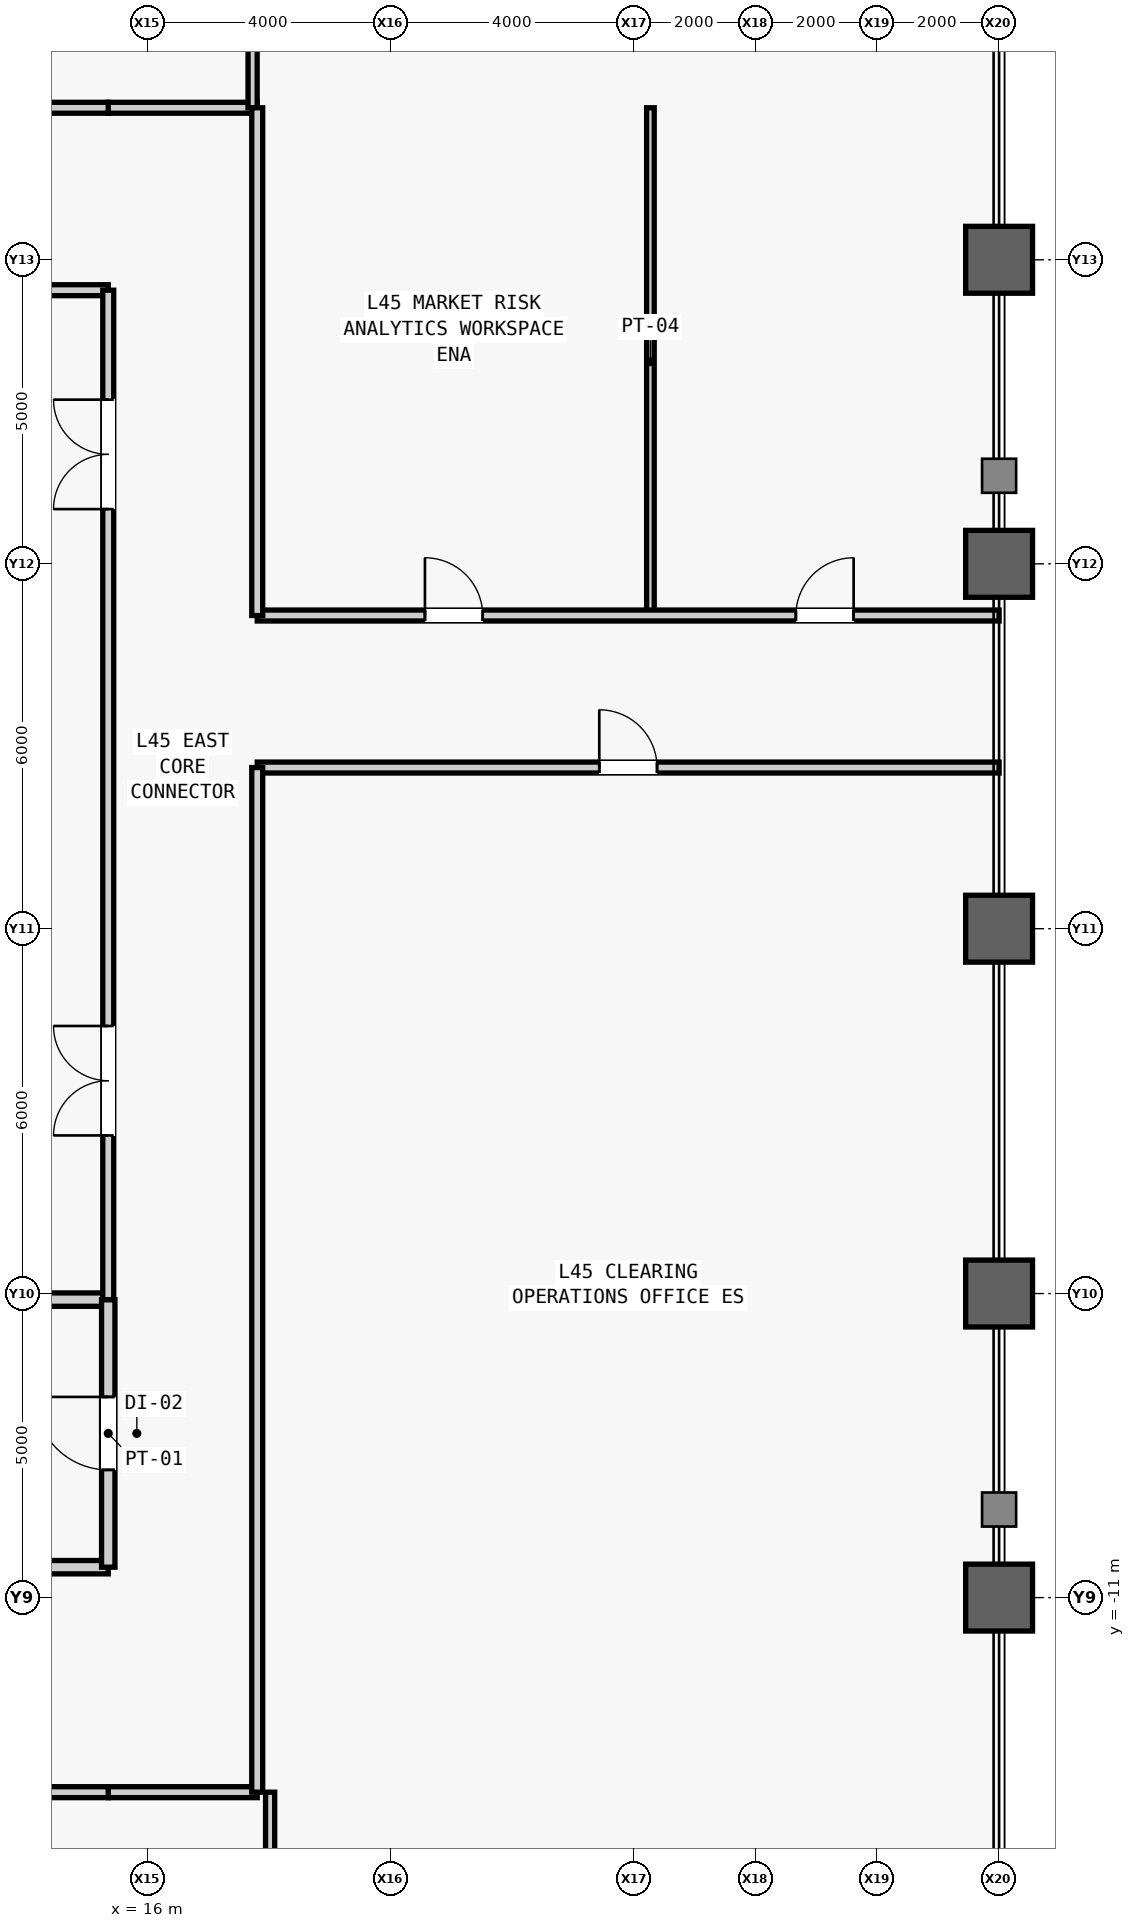
"""IFC4 building model, lengths in metres.
Left out: names, types, materials, properties, quantities, classifications, styles, units other than length and angle.
Written with IfcOpenShell. Run it as: python <this file> out.ifc"""

import sys

from ifc_helpers import new_model, si_unit, direction, frame, frame_2d, origin, origin_2d, place, context, subcontext, project, spatial, rectangle, hollow_rectangle, extrude, source, transform, mapped, element, fill, save


model = new_model("IFC4")
c1 = context("Model", 3, precision=1e-05, world=origin(), true_north=direction((0.0, 1.0)))
c2 = subcontext(c1, "Body", "Model", "MODEL_VIEW")
j1 = project(units=[si_unit("LENGTHUNIT", "METRE"), si_unit("PLANEANGLEUNIT", "RADIAN")], contexts=[c1])
p1 = place(None, origin())
s1 = spatial("IfcSite", under=j1, at=p1, CompositionType="ELEMENT")
p2 = place(p1, origin())
s2 = spatial("IfcBuilding", under=s1, at=p2, CompositionType="ELEMENT")
p3 = place(p2, frame((0.0, 0.0, 195.1)))
s3 = spatial("IfcBuildingStorey", under=s2, at=p3, CompositionType="ELEMENT", Elevation=195.1)
m1 = source(origin(), c2, "Body", "SweptSolid", [
    extrude(hollow_rectangle(XDim=1.1, YDim=1.1, WallThickness=0.06, at=origin_2d()), origin(), (0.0, 0.0, 1.0), 4.0),
])
for number, where, z_axis, x_axis in (
    (1, (30.0, -11.0, 0.0), (0.0, 0.0, 1.0), (1.0, 0.0, 0.0)),
    (2, (30.0, -6.0, 0.0), (0.0, 0.0, 1.0), (1.0, 0.0, 0.0)),
    (3, (30.0, 0.0, 0.0), (0.0, 0.0, 1.0), (1.0, 0.0, 0.0)),
    (4, (30.0, 6.0, 0.0), (0.0, 0.0, 1.0), (1.0, 0.0, 0.0)),
    (5, (30.0, 11.0, 0.0), (0.0, 0.0, 1.0), (1.0, 0.0, 0.0)),
):
    element("IfcColumn", number, at=place(p3, frame(where, z_axis=z_axis, x_axis=x_axis)), inside=s3, PredefinedType="COLUMN", context=c2, shape_type="MappedRepresentation", body=[
        mapped(m1, transform((0.0, 0.0, 0.0), scale=1.0)),
    ])
m2 = source(origin(), c2, "Body", "SweptSolid", [
    extrude(rectangle(XDim=4.05, YDim=0.22, at=frame_2d((2.025, 0.0))), origin(), (0.0, 0.0, 1.0), 3.78),
])
p4 = place(p3, frame((11.3, -10.5, 0.0), z_axis=(0.0, 0.0, 1.0), x_axis=(1.0, 0.0, 0.0)))
e6 = element("IfcWall", 6, at=p4, inside=s3, PredefinedType="PARTITIONING", context=c2, shape_type="MappedRepresentation", body=[
    mapped(m2, transform((0.0, 0.0, 0.0), scale=1.0)),
])
m3 = source(origin(), c2, "Body", "SweptSolid", [
    extrude(rectangle(XDim=4.05, YDim=0.22, at=frame_2d((2.025, 0.0))), origin(), (0.0, 0.0, 1.0), 3.007),
])
p5 = place(p3, frame((11.3, -6.1, 0.0), z_axis=(0.0, 0.0, 1.0), x_axis=(1.0, 0.0, 0.0)))
e7 = element("IfcWall", 7, at=p5, inside=s3, PredefinedType="PARTITIONING", context=c2, shape_type="MappedRepresentation", body=[
    mapped(m3, transform((0.0, 0.0, 0.0), scale=1.0)),
])
m4 = source(origin(), c2, "Body", "SweptSolid", [
    extrude(rectangle(XDim=4.4, YDim=0.22, at=frame_2d((2.2, 0.0))), origin(), (0.0, 0.0, 1.0), 3.78),
])
p6 = place(p3, frame((15.35, -10.5, 0.0), z_axis=(0.0, 0.0, 1.0), x_axis=(0.0, 1.0, 0.0)))
e8 = element("IfcWall", 8, at=p6, inside=s3, PredefinedType="PARTITIONING", context=c2, shape_type="MappedRepresentation", body=[
    mapped(m4, transform((0.0, 0.0, 0.0), scale=1.0)),
])
m5 = source(origin(), c2, "Body", "SweptSolid", [
    extrude(rectangle(XDim=1.2, YDim=2.2, at=frame_2d((0.6, 1.1))), frame((0.0, 0.12, 0.0), z_axis=(0.0, -1.0, 0.0), x_axis=(1.0, 0.0, 0.0)), (0.0, 0.0, 1.0), 0.24),
])
p7 = place(p6, frame((1.6, 0.0, 0.0)))
e9 = element("IfcOpeningElement", 9, at=p7, cuts=e8, PredefinedType="OPENING", context=c2, shape_type="MappedRepresentation", body=[
    mapped(m5, transform((0.0, 0.0, 0.0), scale=1.0)),
])
m6 = source(origin(), c2, "Body", "SweptSolid", [
    extrude(rectangle(XDim=4.05, YDim=0.18, at=frame_2d((2.025, 0.0))), origin(), (0.0, 0.0, 1.0), 3.78),
])
p8 = place(p3, frame((11.3, 10.5, 0.0), z_axis=(0.0, 0.0, 1.0), x_axis=(1.0, 0.0, 0.0)))
e10 = element("IfcWall", 10, at=p8, inside=s3, PredefinedType="PARTITIONING", context=c2, shape_type="MappedRepresentation", body=[
    mapped(m6, transform((0.0, 0.0, 0.0), scale=1.0)),
])
m7 = source(origin(), c2, "Body", "SweptSolid", [
    extrude(rectangle(XDim=16.6, YDim=0.18, at=frame_2d((8.3, 0.0))), origin(), (0.0, 0.0, 1.0), 3.78),
])
p9 = place(p3, frame((15.35, -6.1, 0.0), z_axis=(0.0, 0.0, 1.0), x_axis=(0.0, 1.0, 0.0)))
e11 = element("IfcWall", 11, at=p9, inside=s3, PredefinedType="PARTITIONING", context=c2, shape_type="MappedRepresentation", body=[
    mapped(m7, transform((0.0, 0.0, 0.0), scale=1.0)),
])
m8 = source(origin(), c2, "Body", "SweptSolid", [
    extrude(rectangle(XDim=1.8, YDim=2.25, at=frame_2d((0.9, 1.125))), frame((0.0, 0.1, 0.0), z_axis=(0.0, -1.0, 0.0), x_axis=(1.0, 0.0, 0.0)), (0.0, 0.0, 1.0), 0.2),
])
p10 = place(p9, frame((2.7, 0.0, 0.0)))
e12 = element("IfcOpeningElement", 12, at=p10, cuts=e11, PredefinedType="OPENING", context=c2, shape_type="MappedRepresentation", body=[
    mapped(m8, transform((0.0, 0.0, 0.0), scale=1.0)),
])
p11 = place(p9, frame((13.0, 0.0, 0.0)))
e13 = element("IfcOpeningElement", 13, at=p11, cuts=e11, PredefinedType="OPENING", context=c2, shape_type="MappedRepresentation", body=[
    mapped(m8, transform((0.0, 0.0, 0.0), scale=1.0)),
])
m9 = source(origin(), c2, "Body", "SweptSolid", [
    extrude(rectangle(XDim=2.45, YDim=0.18, at=frame_2d((1.225, 0.0))), origin(), (0.0, 0.0, 1.0), 3.78),
])
for number, where, z_axis, x_axis in (
    (14, (15.35, -14.2, 0.0), (0.0, 0.0, 1.0), (1.0, 0.0, 0.0)),
    (15, (15.35, 13.5, 0.0), (0.0, 0.0, 1.0), (1.0, 0.0, 0.0)),
):
    element("IfcWall", number, at=place(p3, frame(where, z_axis=z_axis, x_axis=x_axis)), inside=s3, PredefinedType="PARTITIONING", context=c2, shape_type="MappedRepresentation", body=[
        mapped(m9, transform((0.0, 0.0, 0.0), scale=1.0)),
    ])
m10 = source(origin(), c2, "Body", "SweptSolid", [
    extrude(rectangle(XDim=15.8, YDim=0.15, at=frame_2d((7.9, 0.0))), origin(), (0.0, 0.0, 1.0), 3.78),
])
p12 = place(p3, frame((18.012, -30.0, 0.0), z_axis=(0.0, 0.0, 1.0), x_axis=(0.0, 1.0, 0.0)))
e16 = element("IfcWall", 16, at=p12, inside=s3, PredefinedType="PARTITIONING", context=c2, shape_type="MappedRepresentation", body=[
    mapped(m10, transform((0.0, 0.0, 0.0), scale=1.0)),
])
m11 = source(origin(), c2, "Body", "SweptSolid", [
    extrude(rectangle(XDim=0.95, YDim=2.15, at=frame_2d((0.475, 1.075))), frame((0.0, 0.085, 0.0), z_axis=(0.0, -1.0, 0.0), x_axis=(1.0, 0.0, 0.0)), (0.0, 0.0, 1.0), 0.17),
])
p13 = place(p12, frame((11.375, 0.0, 0.0)))
e17 = element("IfcOpeningElement", 17, at=p13, cuts=e16, PredefinedType="OPENING", context=c2, shape_type="MappedRepresentation", body=[
    mapped(m11, transform((0.0, 0.0, 0.0), scale=1.0)),
])
m12 = source(origin(), c2, "Body", "SweptSolid", [
    extrude(rectangle(XDim=13.25, YDim=0.18, at=frame_2d((6.625, 0.0))), origin(), (0.0, 0.0, 1.0), 3.78),
])
p14 = place(p3, frame((2.1, -14.2, 0.0), z_axis=(0.0, 0.0, 1.0), x_axis=(1.0, 0.0, 0.0)))
e18 = element("IfcWall", 18, at=p14, inside=s3, PredefinedType="PARTITIONING", context=c2, shape_type="MappedRepresentation", body=[
    mapped(m12, transform((0.0, 0.0, 0.0), scale=1.0)),
])
m13 = source(origin(), c2, "Body", "SweptSolid", [
    extrude(rectangle(XDim=16.5, YDim=0.15, at=frame_2d((8.25, 0.0))), origin(), (0.0, 0.0, 1.0), 3.78),
])
p15 = place(p3, frame((17.724, 13.5, 0.0), z_axis=(0.0, 0.0, 1.0), x_axis=(0.0, 1.0, 0.0)))
e19 = element("IfcWall", 19, at=p15, inside=s3, PredefinedType="PARTITIONING", context=c2, shape_type="MappedRepresentation", body=[
    mapped(m13, transform((0.0, 0.0, 0.0), scale=1.0)),
])
p16 = place(p15, frame((11.9, 0.0, 0.0)))
e20 = element("IfcOpeningElement", 20, at=p16, cuts=e19, PredefinedType="OPENING", context=c2, shape_type="MappedRepresentation", body=[
    mapped(m11, transform((0.0, 0.0, 0.0), scale=1.0)),
])
m14 = source(origin(), c2, "Body", "SweptSolid", [
    extrude(rectangle(XDim=4.25, YDim=0.18, at=frame_2d((2.125, 0.0))), origin(), (0.0, 0.0, 1.0), 3.78),
])
p17 = place(p3, frame((11.1, 13.5, 0.0), z_axis=(0.0, 0.0, 1.0), x_axis=(1.0, 0.0, 0.0)))
e21 = element("IfcWall", 21, at=p17, inside=s3, PredefinedType="PARTITIONING", context=c2, shape_type="MappedRepresentation", body=[
    mapped(m14, transform((0.0, 0.0, 0.0), scale=1.0)),
])
m15 = source(origin(), c2, "Body", "SweptSolid", [
    extrude(rectangle(XDim=12.2, YDim=0.18, at=frame_2d((6.1, 0.0))), origin(), (0.0, 0.0, 1.0), 3.78),
])
p18 = place(p3, frame((17.8, 2.65, 0.0), z_axis=(0.0, 0.0, 1.0), x_axis=(1.0, 0.0, 0.0)))
e22 = element("IfcWall", 22, at=p18, inside=s3, PredefinedType="PARTITIONING", context=c2, shape_type="MappedRepresentation", body=[
    mapped(m15, transform((0.0, 0.0, 0.0), scale=1.0)),
])
m16 = source(origin(), c2, "Body", "SweptSolid", [
    extrude(rectangle(XDim=0.95, YDim=2.15, at=frame_2d((0.475, 1.075))), frame((0.0, 0.1, 0.0), z_axis=(0.0, -1.0, 0.0), x_axis=(1.0, 0.0, 0.0)), (0.0, 0.0, 1.0), 0.2),
])
p19 = place(p18, frame((5.625, 0.0, 0.0)))
e23 = element("IfcOpeningElement", 23, at=p19, cuts=e22, PredefinedType="OPENING", context=c2, shape_type="MappedRepresentation", body=[
    mapped(m16, transform((0.0, 0.0, 0.0), scale=1.0)),
])
m17 = source(origin(), c2, "Body", "SweptSolid", [
    extrude(rectangle(XDim=16.85, YDim=0.18, at=frame_2d((8.425, 0.0))), origin(), (0.0, 0.0, 1.0), 3.78),
])
p20 = place(p3, frame((17.8, -14.2, 0.0), z_axis=(0.0, 0.0, 1.0), x_axis=(0.0, 1.0, 0.0)))
e24 = element("IfcWall", 24, at=p20, inside=s3, PredefinedType="PARTITIONING", context=c2, shape_type="MappedRepresentation", body=[
    mapped(m17, transform((0.0, 0.0, 0.0), scale=1.0)),
])
m18 = source(origin(), c2, "Body", "SweptSolid", [
    extrude(rectangle(XDim=8.35, YDim=0.125, at=frame_2d((4.175, 0.0))), origin(), (0.0, 0.0, 1.0), 3.78),
])
p21 = place(p3, frame((24.266, 5.15, 0.0), z_axis=(0.0, 0.0, 1.0), x_axis=(0.0, 1.0, 0.0)))
e25 = element("IfcWall", 25, at=p21, inside=s3, PredefinedType="PARTITIONING", context=c2, shape_type="MappedRepresentation", body=[
    mapped(m18, transform((0.0, 0.0, 0.0), scale=1.0)),
])
p22 = place(p3, frame((17.8, 5.15, 0.0), z_axis=(0.0, 0.0, 1.0), x_axis=(1.0, 0.0, 0.0)))
e26 = element("IfcWall", 26, at=p22, inside=s3, PredefinedType="PARTITIONING", context=c2, shape_type="MappedRepresentation", body=[
    mapped(m15, transform((0.0, 0.0, 0.0), scale=1.0)),
])
p23 = place(p22, frame((2.758, 0.0, 0.0)))
e27 = element("IfcOpeningElement", 27, at=p23, cuts=e26, PredefinedType="OPENING", context=c2, shape_type="MappedRepresentation", body=[
    mapped(m16, transform((0.0, 0.0, 0.0), scale=1.0)),
])
p24 = place(p22, frame((8.858, 0.0, 0.0)))
e28 = element("IfcOpeningElement", 28, at=p24, cuts=e26, PredefinedType="OPENING", context=c2, shape_type="MappedRepresentation", body=[
    mapped(m16, transform((0.0, 0.0, 0.0), scale=1.0)),
])
m19 = source(origin(), c2, "Body", "SweptSolid", [
    extrude(rectangle(XDim=8.35, YDim=0.18, at=frame_2d((4.175, 0.0))), origin(), (0.0, 0.0, 1.0), 3.78),
])
p25 = place(p3, frame((17.8, 5.15, 0.0), z_axis=(0.0, 0.0, 1.0), x_axis=(0.0, 1.0, 0.0)))
e29 = element("IfcWall", 29, at=p25, inside=s3, PredefinedType="PARTITIONING", context=c2, shape_type="MappedRepresentation", body=[
    mapped(m19, transform((0.0, 0.0, 0.0), scale=1.0)),
])
m20 = source(origin(), c2, "Body", "SweptSolid", [
    extrude(rectangle(XDim=1.2, YDim=2.2, at=frame_2d((0.6, 1.1))), frame((0.0, 0.025, 0.0), z_axis=(0.0, -1.0, 0.0), x_axis=(1.0, 0.0, 0.0)), (0.0, 0.0, 1.0), 0.05),
])
p26 = place(p7, origin())
e30 = element("IfcDoor", 30, at=p26, inside=s3, OperationType="SINGLE_SWING_RIGHT", PredefinedType="DOOR", context=c2, shape_type="MappedRepresentation", body=[
    mapped(m20, transform((0.0, 0.0, 0.0), scale=1.0)),
])
fill(e9, e30)
m21 = source(origin(), c2, "Body", "SweptSolid", [
    extrude(rectangle(XDim=1.8, YDim=2.25, at=frame_2d((0.9, 1.125))), frame((0.0, 0.025, 0.0), z_axis=(0.0, -1.0, 0.0), x_axis=(1.0, 0.0, 0.0)), (0.0, 0.0, 1.0), 0.05),
])
p27 = place(p10, origin())
e31 = element("IfcDoor", 31, at=p27, inside=s3, OperationType="SINGLE_SWING_RIGHT", PredefinedType="DOOR", context=c2, shape_type="MappedRepresentation", body=[
    mapped(m21, transform((0.0, 0.0, 0.0), scale=1.0)),
])
fill(e12, e31)
p28 = place(p11, origin())
e32 = element("IfcDoor", 32, at=p28, inside=s3, OperationType="SINGLE_SWING_LEFT", PredefinedType="DOOR", context=c2, shape_type="MappedRepresentation", body=[
    mapped(m21, transform((0.0, 0.0, 0.0), scale=1.0)),
])
fill(e13, e32)
m22 = source(origin(), c2, "Body", "SweptSolid", [
    extrude(rectangle(XDim=0.95, YDim=2.15, at=frame_2d((0.475, 1.075))), frame((0.0, 0.025, 0.0), z_axis=(0.0, -1.0, 0.0), x_axis=(1.0, 0.0, 0.0)), (0.0, 0.0, 1.0), 0.05),
])
p29 = place(p19, origin())
e33 = element("IfcDoor", 33, at=p29, inside=s3, OperationType="SINGLE_SWING_LEFT", PredefinedType="DOOR", context=c2, shape_type="MappedRepresentation", body=[
    mapped(m22, transform((0.0, 0.0, 0.0), scale=1.0)),
])
fill(e23, e33)
p30 = place(p23, origin())
e34 = element("IfcDoor", 34, at=p30, inside=s3, OperationType="SINGLE_SWING_LEFT", PredefinedType="DOOR", context=c2, shape_type="MappedRepresentation", body=[
    mapped(m22, transform((0.0, 0.0, 0.0), scale=1.0)),
])
fill(e27, e34)
p31 = place(p24, origin())
e35 = element("IfcDoor", 35, at=p31, inside=s3, OperationType="SINGLE_SWING_RIGHT", PredefinedType="DOOR", context=c2, shape_type="MappedRepresentation", body=[
    mapped(m22, transform((0.0, 0.0, 0.0), scale=1.0)),
])
fill(e28, e35)
save(model, sys.argv[1])
